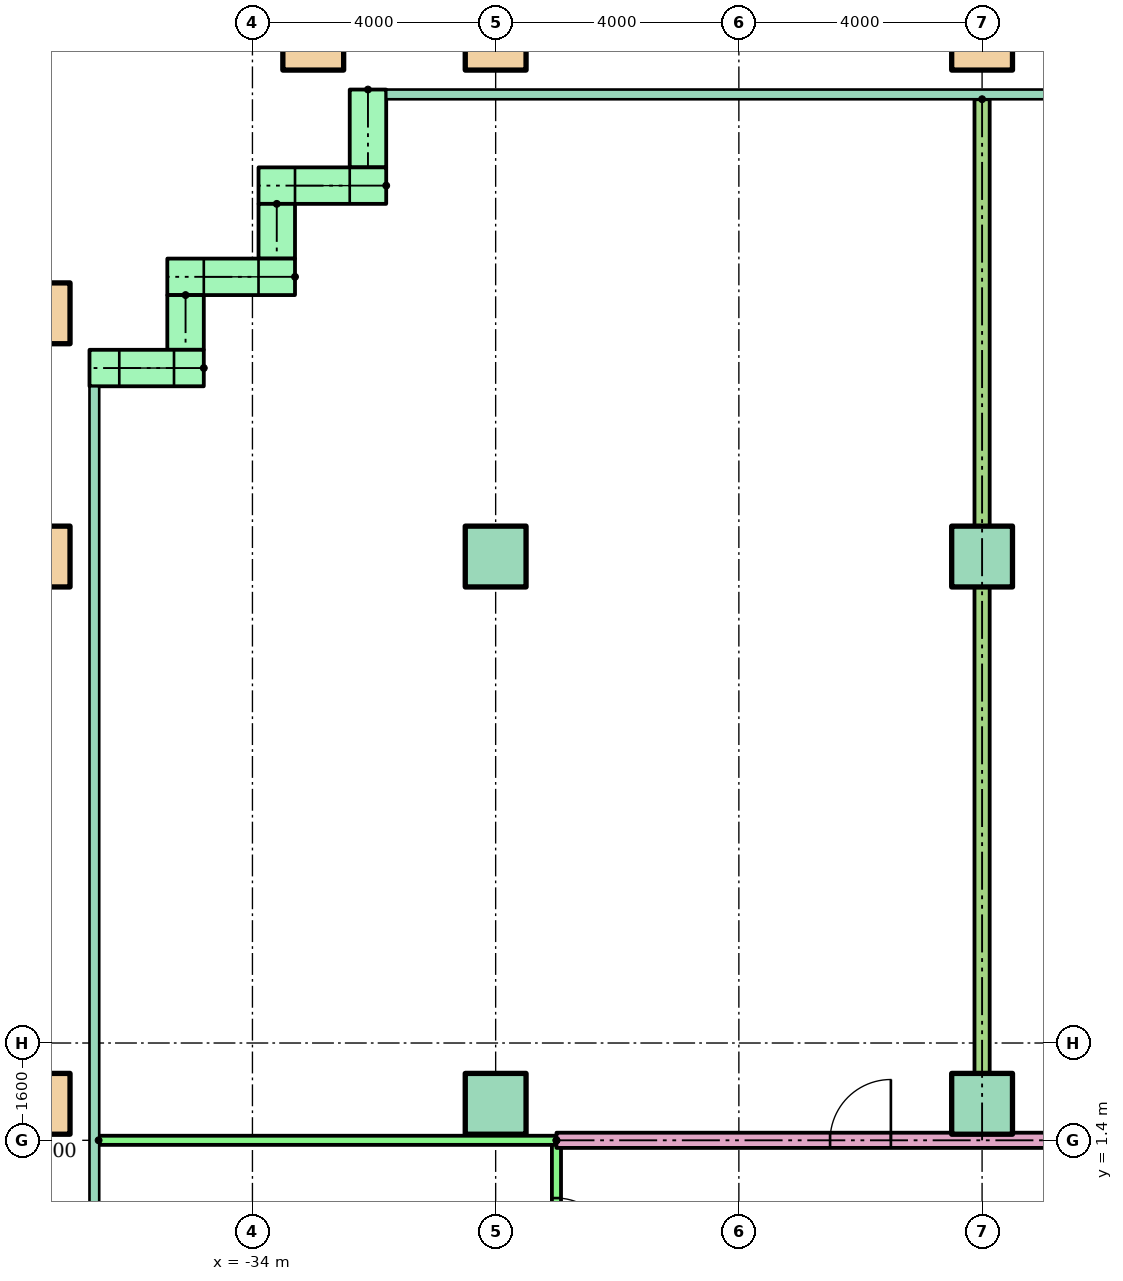
"""IFC4 building model, lengths in metres.
Left out: names, types, materials, properties, quantities, classifications, styles, units other than length and angle.
Written with IfcOpenShell. Run it as: python <this file> out.ifc"""

import sys

from ifc_helpers import new_model, si_unit, direction, frame, frame_2d, origin, origin_2d, place, context, subcontext, project, spatial, rectangle, hollow_rectangle, extrude, element, fill, save


model = new_model("IFC4")
c1 = context("Model", 3, precision=1e-05, world=origin(), true_north=direction((0.0, 1.0)))
c2 = subcontext(c1, "Body", "Model", "MODEL_VIEW")
j1 = project(units=[si_unit("LENGTHUNIT", "METRE"), si_unit("PLANEANGLEUNIT", "RADIAN")], contexts=[c1])
p1 = place(None, origin())
s1 = spatial("IfcSite", under=j1, at=p1, CompositionType="ELEMENT")
p2 = place(p1, origin())
s2 = spatial("IfcBuilding", under=s1, at=p2, CompositionType="ELEMENT")
p3 = place(p2, frame((0.0, 0.0, 37.7)))
s3 = spatial("IfcBuildingStorey", under=s2, at=p3, CompositionType="ELEMENT", Elevation=37.7)
p4 = place(p3, frame((-37.5, 2.0, 0.0)))
e1 = element("IfcColumn", 1, at=p4, inside=s3, PredefinedType="COLUMN", context=c2, shape_type="SweptSolid", body=[
    extrude(hollow_rectangle(XDim=1.0, YDim=1.0, WallThickness=0.05, at=origin_2d()), origin(), (0.0, 0.0, 1.0), 3.9),
])
for number, where in (
    (2, (-30.0, 2.0, 0.0)),
    (3, (-22.0, 2.0, 0.0)),
):
    element("IfcColumn", number, at=place(p3, frame(where)), inside=s3, PredefinedType="COLUMN", context=c2, shape_type="SweptSolid", body=[
        extrude(rectangle(XDim=1.0, YDim=1.0, at=origin_2d()), origin(), (0.0, 0.0, 1.0), 3.9),
    ])
p5 = place(p3, frame((-37.5, 11.0, 0.0)))
e4 = element("IfcColumn", 4, at=p5, inside=s3, PredefinedType="COLUMN", context=c2, shape_type="SweptSolid", body=[
    extrude(hollow_rectangle(XDim=1.0, YDim=1.0, WallThickness=0.05, at=origin_2d()), origin(), (0.0, 0.0, 1.0), 3.9),
])
for number, where in (
    (5, (-30.0, 11.0, 0.0)),
    (6, (-22.0, 11.0, 0.0)),
):
    element("IfcColumn", number, at=place(p3, frame(where)), inside=s3, PredefinedType="COLUMN", context=c2, shape_type="SweptSolid", body=[
        extrude(rectangle(XDim=1.0, YDim=1.0, at=origin_2d()), origin(), (0.0, 0.0, 1.0), 3.9),
    ])
for number, where in (
    (7, (-37.5, 15.0, 0.0)),
    (8, (-33.0, 19.5, 0.0)),
    (9, (-30.0, 19.5, 0.0)),
    (10, (-22.0, 19.5, 0.0)),
):
    element("IfcColumn", number, at=place(p3, frame(where)), inside=s3, PredefinedType="COLUMN", context=c2, shape_type="SweptSolid", body=[
        extrude(hollow_rectangle(XDim=1.0, YDim=1.0, WallThickness=0.05, at=origin_2d()), origin(), (0.0, 0.0, 1.0), 3.9),
    ])
p6 = place(p3, frame((-32.1, 18.68, 0.0), z_axis=(0.0, 0.0, 1.0), x_axis=(0.0, -1.0, 0.0)))
e11 = element("IfcWall", 11, at=p6, inside=s3, PredefinedType="STANDARD", context=c2, shape_type="SweptSolid", body=[
    extrude(rectangle(XDim=1.28, YDim=0.6, at=frame_2d((0.64, 0.0))), origin(), (0.0, 0.0, 1.0), 3.62),
])
p7 = place(p3, frame((-31.8, 17.1, 0.0), z_axis=(0.0, 0.0, 1.0), x_axis=(-1.0, 0.0, 0.0)))
e12 = element("IfcWall", 12, at=p7, inside=s3, PredefinedType="STANDARD", context=c2, shape_type="SweptSolid", body=[
    extrude(rectangle(XDim=2.1, YDim=0.6, at=frame_2d((1.05, 0.0))), origin(), (0.0, 0.0, 1.0), 3.62),
])
p8 = place(p7, frame((0.6, 0.0, 0.9)))
e13 = element("IfcOpeningElement", 13, at=p8, cuts=e12, PredefinedType="OPENING", context=c2, shape_type="SweptSolid", body=[
    extrude(rectangle(XDim=0.9, YDim=1.8, at=frame_2d((0.45, 0.9))), frame((0.0, 0.31, 0.0), z_axis=(0.0, -1.0, 0.0), x_axis=(1.0, 0.0, 0.0)), (0.0, 0.0, 1.0), 0.62),
])
p9 = place(p3, frame((-33.6, 16.8, 0.0), z_axis=(0.0, 0.0, 1.0), x_axis=(0.0, -1.0, 0.0)))
e14 = element("IfcWall", 14, at=p9, inside=s3, PredefinedType="STANDARD", context=c2, shape_type="SweptSolid", body=[
    extrude(rectangle(XDim=0.9, YDim=0.6, at=frame_2d((0.45, 0.0))), origin(), (0.0, 0.0, 1.0), 3.62),
])
p10 = place(p3, frame((-33.3, 15.6, 0.0), z_axis=(0.0, 0.0, 1.0), x_axis=(-1.0, 0.0, 0.0)))
e15 = element("IfcWall", 15, at=p10, inside=s3, PredefinedType="STANDARD", context=c2, shape_type="SweptSolid", body=[
    extrude(rectangle(XDim=2.1, YDim=0.6, at=frame_2d((1.05, 0.0))), origin(), (0.0, 0.0, 1.0), 3.62),
])
p11 = place(p10, frame((0.6, 0.0, 0.9)))
e16 = element("IfcOpeningElement", 16, at=p11, cuts=e15, PredefinedType="OPENING", context=c2, shape_type="SweptSolid", body=[
    extrude(rectangle(XDim=0.9, YDim=1.8, at=frame_2d((0.45, 0.9))), frame((0.0, 0.31, 0.0), z_axis=(0.0, -1.0, 0.0), x_axis=(1.0, 0.0, 0.0)), (0.0, 0.0, 1.0), 0.62),
])
p12 = place(p3, frame((-35.1, 15.3, 0.0), z_axis=(0.0, 0.0, 1.0), x_axis=(0.0, -1.0, 0.0)))
e17 = element("IfcWall", 17, at=p12, inside=s3, PredefinedType="STANDARD", context=c2, shape_type="SweptSolid", body=[
    extrude(rectangle(XDim=0.9, YDim=0.6, at=frame_2d((0.45, 0.0))), origin(), (0.0, 0.0, 1.0), 3.62),
])
p13 = place(p3, frame((-34.8, 14.1, 0.0), z_axis=(0.0, 0.0, 1.0), x_axis=(-1.0, 0.0, 0.0)))
e18 = element("IfcWall", 18, at=p13, inside=s3, PredefinedType="STANDARD", context=c2, shape_type="SweptSolid", body=[
    extrude(rectangle(XDim=1.88, YDim=0.6, at=frame_2d((0.94, 0.0))), origin(), (0.0, 0.0, 1.0), 3.62),
])
p14 = place(p13, frame((0.49, 0.0, 0.9)))
e19 = element("IfcOpeningElement", 19, at=p14, cuts=e18, PredefinedType="OPENING", context=c2, shape_type="SweptSolid", body=[
    extrude(rectangle(XDim=0.9, YDim=1.8, at=frame_2d((0.45, 0.9))), frame((0.0, 0.31, 0.0), z_axis=(0.0, -1.0, 0.0), x_axis=(1.0, 0.0, 0.0)), (0.0, 0.0, 1.0), 0.62),
])
p15 = place(p3, frame((-29.0, 1.4, 0.0), z_axis=(0.0, 0.0, 1.0), x_axis=(0.0, -1.0, 0.0)))
e20 = element("IfcWall", 20, at=p15, inside=s3, PredefinedType="PARTITIONING", context=c2, shape_type="SweptSolid", body=[
    extrude(rectangle(XDim=2.8, YDim=0.15, at=frame_2d((1.4, 0.0))), origin(), (0.0, 0.0, 1.0), 3.1),
])
p16 = place(p15, frame((0.95, 0.0, 0.0)))
e21 = element("IfcOpeningElement", 21, at=p16, cuts=e20, PredefinedType="OPENING", context=c2, shape_type="SweptSolid", body=[
    extrude(rectangle(XDim=0.9, YDim=2.1, at=frame_2d((0.45, 1.05))), frame((0.0, 0.085, 0.0), z_axis=(0.0, -1.0, 0.0), x_axis=(1.0, 0.0, 0.0)), (0.0, 0.0, 1.0), 0.17),
])
p17 = place(p3, frame((-29.0, 1.4, 0.0)))
e22 = element("IfcWall", 22, at=p17, inside=s3, PredefinedType="PARTITIONING", context=c2, shape_type="SweptSolid", body=[
    extrude(rectangle(XDim=15.0, YDim=0.25, at=frame_2d((7.5, 0.0))), origin(), (0.0, 0.0, 1.0), 3.1),
])
p18 = place(p17, frame((12.5, 0.0, 0.0)))
e23 = element("IfcOpeningElement", 23, at=p18, cuts=e22, PredefinedType="OPENING", context=c2, shape_type="SweptSolid", body=[
    extrude(rectangle(XDim=1.0, YDim=2.1, at=frame_2d((0.5, 1.05))), frame((0.0, 0.135, 0.0), z_axis=(0.0, -1.0, 0.0), x_axis=(1.0, 0.0, 0.0)), (0.0, 0.0, 1.0), 0.27),
])
p19 = place(p17, frame((4.5, 0.0, 0.0)))
e24 = element("IfcOpeningElement", 24, at=p19, cuts=e22, PredefinedType="OPENING", context=c2, shape_type="SweptSolid", body=[
    extrude(rectangle(XDim=1.0, YDim=2.1, at=frame_2d((0.5, 1.05))), frame((0.0, 0.135, 0.0), z_axis=(0.0, -1.0, 0.0), x_axis=(1.0, 0.0, 0.0)), (0.0, 0.0, 1.0), 0.27),
])
p20 = place(p3, frame((-36.53, 1.4, 0.0)))
e25 = element("IfcWall", 25, at=p20, inside=s3, PredefinedType="PARTITIONING", context=c2, shape_type="SweptSolid", body=[
    extrude(rectangle(XDim=7.53, YDim=0.15, at=frame_2d((3.765, 0.0))), origin(), (0.0, 0.0, 1.0), 3.1),
])
p21 = place(p3, frame((-22.0, 18.521, 0.0), z_axis=(0.0, 0.0, 1.0), x_axis=(0.0, -1.0, 0.0)))
e26 = element("IfcWall", 26, at=p21, inside=s3, PredefinedType="PARTITIONING", context=c2, shape_type="SweptSolid", body=[
    extrude(rectangle(XDim=17.121, YDim=0.25, at=frame_2d((8.561, 0.0))), origin(), (0.0, 0.0, 1.0), 3.1),
])
p22 = place(p8, origin())
e27 = element("IfcWindow", 27, at=p22, inside=s3, PartitioningType="SINGLE_PANEL", PredefinedType="WINDOW", context=c2, shape_type="SweptSolid", body=[
    extrude(rectangle(XDim=0.9, YDim=1.8, at=frame_2d((0.45, 0.9))), frame((0.0, 0.03, 0.0), z_axis=(0.0, -1.0, 0.0), x_axis=(1.0, 0.0, 0.0)), (0.0, 0.0, 1.0), 0.06),
])
fill(e13, e27)
p23 = place(p11, origin())
e28 = element("IfcWindow", 28, at=p23, inside=s3, PartitioningType="SINGLE_PANEL", PredefinedType="WINDOW", context=c2, shape_type="SweptSolid", body=[
    extrude(rectangle(XDim=0.9, YDim=1.8, at=frame_2d((0.45, 0.9))), frame((0.0, 0.03, 0.0), z_axis=(0.0, -1.0, 0.0), x_axis=(1.0, 0.0, 0.0)), (0.0, 0.0, 1.0), 0.06),
])
fill(e16, e28)
p24 = place(p14, origin())
e29 = element("IfcWindow", 29, at=p24, inside=s3, PartitioningType="SINGLE_PANEL", PredefinedType="WINDOW", context=c2, shape_type="SweptSolid", body=[
    extrude(rectangle(XDim=0.9, YDim=1.8, at=frame_2d((0.45, 0.9))), frame((0.0, 0.03, 0.0), z_axis=(0.0, -1.0, 0.0), x_axis=(1.0, 0.0, 0.0)), (0.0, 0.0, 1.0), 0.06),
])
fill(e19, e29)
p25 = place(p16, origin())
e30 = element("IfcDoor", 30, at=p25, inside=s3, OperationType="SINGLE_SWING_RIGHT", PredefinedType="DOOR", context=c2, shape_type="SweptSolid", body=[
    extrude(rectangle(XDim=0.9, YDim=2.1, at=frame_2d((0.45, 1.05))), frame((0.0, 0.025, 0.0), z_axis=(0.0, -1.0, 0.0), x_axis=(1.0, 0.0, 0.0)), (0.0, 0.0, 1.0), 0.05),
])
fill(e21, e30)
p26 = place(p19, origin())
e31 = element("IfcDoor", 31, at=p26, inside=s3, OperationType="SINGLE_SWING_RIGHT", PredefinedType="DOOR", context=c2, shape_type="SweptSolid", body=[
    extrude(rectangle(XDim=1.0, YDim=2.1, at=frame_2d((0.5, 1.05))), frame((0.0, 0.025, 0.0), z_axis=(0.0, -1.0, 0.0), x_axis=(1.0, 0.0, 0.0)), (0.0, 0.0, 1.0), 0.05),
])
fill(e24, e31)
save(model, sys.argv[1])
